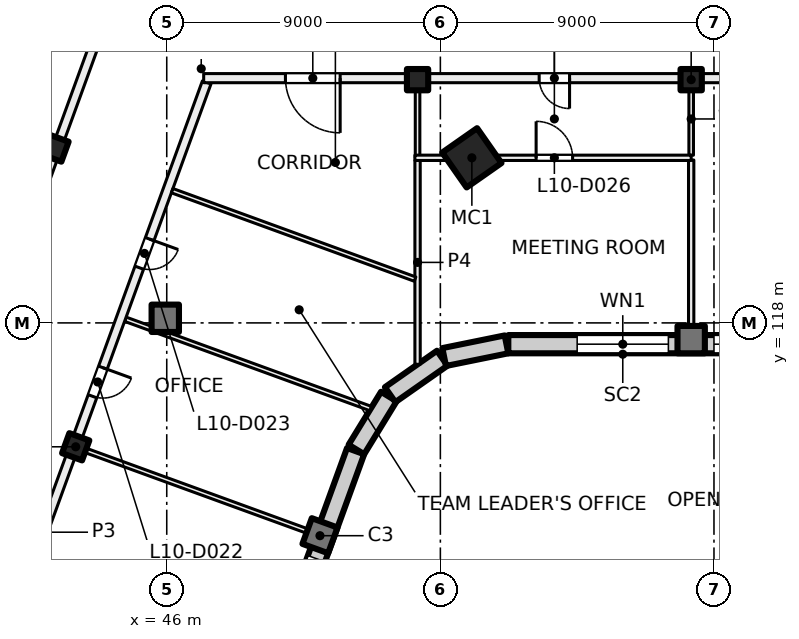
"""IFC4 building model, lengths in metres.
Left out: names, types, materials, properties, quantities, classifications, styles, units other than length and angle.
Written with IfcOpenShell. Run it as: python <this file> out.ifc"""

import sys

from ifc_helpers import new_model, si_unit, direction, frame, frame_2d, origin, origin_2d, place, context, subcontext, project, spatial, rectangle, hollow_rectangle, extrude, element, fill, save


model = new_model("IFC4")
c1 = context("Model", 3, precision=1e-05, world=origin(), true_north=direction((0.0, 1.0)))
c2 = subcontext(c1, "Body", "Model", "MODEL_VIEW")
j1 = project(units=[si_unit("LENGTHUNIT", "METRE"), si_unit("PLANEANGLEUNIT", "RADIAN")], contexts=[c1])
p1 = place(None, origin())
s1 = spatial("IfcSite", under=j1, at=p1, CompositionType="ELEMENT")
p2 = place(p1, origin())
s2 = spatial("IfcBuilding", under=s1, at=p2, CompositionType="ELEMENT")
p3 = place(p2, frame((0.0, 0.0, 47.5)))
s3 = spatial("IfcBuildingStorey", under=s2, at=p3, CompositionType="ELEMENT", Elevation=47.5)
p4 = place(p3, frame((56.036, 123.43, 0.0), z_axis=(0.0, 0.0, 1.0), x_axis=(0.573576436351, -0.819152044289, 0.0)))
e1 = element("IfcColumn", 1, at=p4, inside=s3, PredefinedType="COLUMN", context=c2, shape_type="SweptSolid", body=[
    extrude(hollow_rectangle(XDim=1.4, YDim=1.4, WallThickness=0.04, at=origin_2d()), origin(), (0.0, 0.0, 1.0), 4.0),
])
for number, where, z_axis, x_axis in (
    (2, (54.25, 126.0, 0.0), (0.0, 0.0, 1.0), (1.0, 0.0, 0.0)),
    (3, (63.25, 126.0, 0.0), (0.0, 0.0, 1.0), (1.0, 0.0, 0.0)),
):
    element("IfcColumn", number, at=place(p3, frame(where, z_axis=z_axis, x_axis=x_axis)), inside=s3, PredefinedType="COLUMN", context=c2, shape_type="SweptSolid", body=[
        extrude(rectangle(XDim=0.7, YDim=0.7, at=origin_2d()), origin(), (0.0, 0.0, 1.0), 4.0),
    ])
for number, where, z_axis, x_axis in (
    (4, (45.952, 118.152, 0.0), (0.0, 0.0, 1.0), (1.0, 0.0, 0.0)),
    (5, (63.25, 117.45, 0.0), (0.0, 0.0, 1.0), (1.0, 0.0, 0.0)),
):
    element("IfcColumn", number, at=place(p3, frame(where, z_axis=z_axis, x_axis=x_axis)), inside=s3, PredefinedType="COLUMN", context=c2, shape_type="SweptSolid", body=[
        extrude(rectangle(XDim=0.9, YDim=0.9, at=origin_2d()), origin(), (0.0, 0.0, 1.0), 4.0),
    ])
for number, where, z_axis, x_axis in (
    (6, (43.006, 113.925, 0.0), (0.0, 0.0, 1.0), (-0.342, -0.94, 0.0)),
    (7, (42.325, 123.751, 0.0), (0.0, 0.0, 1.0), (-0.342, -0.94, 0.0)),
):
    element("IfcColumn", number, at=place(p3, frame(where, z_axis=z_axis, x_axis=x_axis)), inside=s3, PredefinedType="COLUMN", context=c2, shape_type="SweptSolid", body=[
        extrude(rectangle(XDim=0.7, YDim=0.7, at=origin_2d()), origin(), (0.0, 0.0, 1.0), 4.0),
    ])
p5 = place(p3, frame((51.04, 111.001, 0.0), z_axis=(0.0, 0.0, 1.0), x_axis=(-0.342020143326, -0.939692620786, 0.0)))
e8 = element("IfcColumn", 8, at=p5, inside=s3, PredefinedType="COLUMN", context=c2, shape_type="SweptSolid", body=[
    extrude(rectangle(XDim=0.9, YDim=0.9, at=origin_2d()), origin(), (0.0, 0.0, 1.0), 4.0),
])
p6 = place(p3, frame((52.212, 113.783, 0.0), z_axis=(0.0, 0.0, 1.0), x_axis=(-0.34202521188, -0.939690775968, 0.0)))
e9 = element("IfcWall", 9, at=p6, inside=s3, PredefinedType="SOLIDWALL", context=c2, shape_type="SweptSolid", body=[
    extrude(rectangle(XDim=21.745, YDim=0.6, at=frame_2d((10.873, 0.0))), origin(), (0.0, 0.0, 1.0), 3.625),
])
p7 = place(p6, frame((3.765, 0.0, 0.9)))
e10 = element("IfcOpeningElement", 10, at=p7, cuts=e9, PredefinedType="OPENING", context=c2, shape_type="SweptSolid", body=[
    extrude(rectangle(XDim=3.0, YDim=2.4, at=frame_2d((1.5, 1.2))), frame((0.0, 0.31, 0.0), z_axis=(0.0, -1.0, 0.0), x_axis=(1.0, 0.0, 0.0)), (0.0, 0.0, 1.0), 0.62),
])
p8 = place(p6, frame((8.265, 0.0, 0.9)))
e11 = element("IfcOpeningElement", 11, at=p8, cuts=e9, PredefinedType="OPENING", context=c2, shape_type="SweptSolid", body=[
    extrude(rectangle(XDim=3.0, YDim=2.4, at=frame_2d((1.5, 1.2))), frame((0.0, 0.31, 0.0), z_axis=(0.0, -1.0, 0.0), x_axis=(1.0, 0.0, 0.0)), (0.0, 0.0, 1.0), 0.62),
])
p9 = place(p6, frame((12.765, 0.0, 0.9)))
e12 = element("IfcOpeningElement", 12, at=p9, cuts=e9, PredefinedType="OPENING", context=c2, shape_type="SweptSolid", body=[
    extrude(rectangle(XDim=3.0, YDim=2.4, at=frame_2d((1.5, 1.2))), frame((0.0, 0.31, 0.0), z_axis=(0.0, -1.0, 0.0), x_axis=(1.0, 0.0, 0.0)), (0.0, 0.0, 1.0), 0.62),
])
p10 = place(p6, frame((17.265, 0.0, 0.9)))
e13 = element("IfcOpeningElement", 13, at=p10, cuts=e9, PredefinedType="OPENING", context=c2, shape_type="SweptSolid", body=[
    extrude(rectangle(XDim=3.0, YDim=2.4, at=frame_2d((1.5, 1.2))), frame((0.0, 0.31, 0.0), z_axis=(0.0, -1.0, 0.0), x_axis=(1.0, 0.0, 0.0)), (0.0, 0.0, 1.0), 0.62),
])
p11 = place(p3, frame((53.305, 115.578, 0.0), z_axis=(0.0, 0.0, 1.0), x_axis=(-0.522402266438, -0.852699168535, 0.0)))
e14 = element("IfcWall", 14, at=p11, inside=s3, PredefinedType="SOLIDWALL", context=c2, shape_type="SweptSolid", body=[
    extrude(rectangle(XDim=2.042, YDim=0.6, at=frame_2d((1.021, 0.0))), origin(), (0.0, 0.0, 1.0), 3.625),
])
for number, where, z_axis, x_axis in (
    (15, (55.062, 116.839, 0.0), (0.0, 0.0, 1.0), (-0.819, -0.574, 0.0)),
    (16, (57.175, 117.294, 0.0), (0.0, 0.0, 1.0), (-0.98, -0.199, 0.0)),
):
    element("IfcWall", number, at=place(p3, frame(where, z_axis=z_axis, x_axis=x_axis)), inside=s3, PredefinedType="SOLIDWALL", context=c2, shape_type="SweptSolid", body=[
        extrude(rectangle(XDim=2.092, YDim=0.6, at=frame_2d((1.046, 0.0))), origin(), (0.0, 0.0, 1.0), 3.625),
    ])
p12 = place(p3, frame((90.98, 117.3, 0.0), z_axis=(0.0, 0.0, 1.0), x_axis=(-1.0, 0.0, 0.0)))
e17 = element("IfcWall", 17, at=p12, inside=s3, PredefinedType="SOLIDWALL", context=c2, shape_type="SweptSolid", body=[
    extrude(rectangle(XDim=33.745, YDim=0.6, at=frame_2d((16.873, 0.0))), origin(), (0.0, 0.0, 1.0), 3.625),
])
p13 = place(p12, frame((1.48, 0.0, 0.9)))
e18 = element("IfcOpeningElement", 18, at=p13, cuts=e17, PredefinedType="OPENING", context=c2, shape_type="SweptSolid", body=[
    extrude(rectangle(XDim=3.0, YDim=2.4, at=frame_2d((1.5, 1.2))), frame((0.0, 0.31, 0.0), z_axis=(0.0, -1.0, 0.0), x_axis=(1.0, 0.0, 0.0)), (0.0, 0.0, 1.0), 0.62),
])
p14 = place(p12, frame((5.98, 0.0, 0.9)))
e19 = element("IfcOpeningElement", 19, at=p14, cuts=e17, PredefinedType="OPENING", context=c2, shape_type="SweptSolid", body=[
    extrude(rectangle(XDim=3.0, YDim=2.4, at=frame_2d((1.5, 1.2))), frame((0.0, 0.31, 0.0), z_axis=(0.0, -1.0, 0.0), x_axis=(1.0, 0.0, 0.0)), (0.0, 0.0, 1.0), 0.62),
])
p15 = place(p12, frame((10.48, 0.0, 0.9)))
e20 = element("IfcOpeningElement", 20, at=p15, cuts=e17, PredefinedType="OPENING", context=c2, shape_type="SweptSolid", body=[
    extrude(rectangle(XDim=3.0, YDim=2.4, at=frame_2d((1.5, 1.2))), frame((0.0, 0.31, 0.0), z_axis=(0.0, -1.0, 0.0), x_axis=(1.0, 0.0, 0.0)), (0.0, 0.0, 1.0), 0.62),
])
p16 = place(p12, frame((14.98, 0.0, 0.9)))
e21 = element("IfcOpeningElement", 21, at=p16, cuts=e17, PredefinedType="OPENING", context=c2, shape_type="SweptSolid", body=[
    extrude(rectangle(XDim=3.0, YDim=2.4, at=frame_2d((1.5, 1.2))), frame((0.0, 0.31, 0.0), z_axis=(0.0, -1.0, 0.0), x_axis=(1.0, 0.0, 0.0)), (0.0, 0.0, 1.0), 0.62),
])
p17 = place(p12, frame((19.48, 0.0, 0.9)))
e22 = element("IfcOpeningElement", 22, at=p17, cuts=e17, PredefinedType="OPENING", context=c2, shape_type="SweptSolid", body=[
    extrude(rectangle(XDim=3.0, YDim=2.4, at=frame_2d((1.5, 1.2))), frame((0.0, 0.31, 0.0), z_axis=(0.0, -1.0, 0.0), x_axis=(1.0, 0.0, 0.0)), (0.0, 0.0, 1.0), 0.62),
])
p18 = place(p12, frame((23.98, 0.0, 0.9)))
e23 = element("IfcOpeningElement", 23, at=p18, cuts=e17, PredefinedType="OPENING", context=c2, shape_type="SweptSolid", body=[
    extrude(rectangle(XDim=3.0, YDim=2.4, at=frame_2d((1.5, 1.2))), frame((0.0, 0.31, 0.0), z_axis=(0.0, -1.0, 0.0), x_axis=(1.0, 0.0, 0.0)), (0.0, 0.0, 1.0), 0.62),
])
p19 = place(p12, frame((28.48, 0.0, 0.9)))
e24 = element("IfcOpeningElement", 24, at=p19, cuts=e17, PredefinedType="OPENING", context=c2, shape_type="SweptSolid", body=[
    extrude(rectangle(XDim=3.0, YDim=2.4, at=frame_2d((1.5, 1.2))), frame((0.0, 0.31, 0.0), z_axis=(0.0, -1.0, 0.0), x_axis=(1.0, 0.0, 0.0)), (0.0, 0.0, 1.0), 0.62),
])
p20 = place(p3, frame((32.881, 97.657, 0.0), z_axis=(0.0, 0.0, 1.0), x_axis=(0.342017360004, 0.939693633828, 0.0)))
e25 = element("IfcWall", 25, at=p20, inside=s3, PredefinedType="PARTITIONING", context=c2, shape_type="SweptSolid", body=[
    extrude(rectangle(XDim=34.516, YDim=0.3, at=frame_2d((17.258, 0.0))), origin(), (0.0, 0.0, 1.0), 3.625),
])
p21 = place(p20, frame((11.5, 0.0, 0.0)))
e26 = element("IfcOpeningElement", 26, at=p21, cuts=e25, PredefinedType="OPENING", context=c2, shape_type="SweptSolid", body=[
    extrude(rectangle(XDim=1.0, YDim=2.1, at=frame_2d((0.5, 1.05))), frame((0.0, 0.16, 0.0), z_axis=(0.0, -1.0, 0.0), x_axis=(1.0, 0.0, 0.0)), (0.0, 0.0, 1.0), 0.32),
])
p22 = place(p20, frame((20.1, 0.0, 0.0)))
e27 = element("IfcOpeningElement", 27, at=p22, cuts=e25, PredefinedType="OPENING", context=c2, shape_type="SweptSolid", body=[
    extrude(rectangle(XDim=1.8, YDim=2.1, at=frame_2d((0.9, 1.05))), frame((0.0, 0.16, 0.0), z_axis=(0.0, -1.0, 0.0), x_axis=(1.0, 0.0, 0.0)), (0.0, 0.0, 1.0), 0.32),
])
p23 = place(p3, frame((42.231, 123.785, 0.0), z_axis=(0.0, 0.0, 1.0), x_axis=(-0.939687752599, 0.342033518263, 0.0)))
e28 = element("IfcWall", 28, at=p23, inside=s3, PredefinedType="PARTITIONING", context=c2, shape_type="SweptSolid", body=[
    extrude(rectangle(XDim=8.301, YDim=0.175, at=frame_2d((4.15, 0.0))), origin(), (0.0, 0.0, 1.0), 3.625),
])
p24 = place(p3, frame((43.1, 113.891, 0.0), z_axis=(0.0, 0.0, 1.0), x_axis=(0.939670544866, -0.342080790328, 0.0)))
e29 = element("IfcWall", 29, at=p24, inside=s3, PredefinedType="PARTITIONING", context=c2, shape_type="SweptSolid", body=[
    extrude(rectangle(XDim=8.3, YDim=0.15, at=frame_2d((4.15, 0.0))), origin(), (0.0, 0.0, 1.0), 3.625),
])
p25 = place(p3, frame((44.639, 118.12, 0.0), z_axis=(0.0, 0.0, 1.0), x_axis=(0.939669707102, -0.342083091593, 0.0)))
e30 = element("IfcWall", 30, at=p25, inside=s3, PredefinedType="PARTITIONING", context=c2, shape_type="SweptSolid", body=[
    extrude(rectangle(XDim=8.589, YDim=0.15, at=frame_2d((4.295, 0.0))), origin(), (0.0, 0.0, 1.0), 3.625),
])
p26 = place(p3, frame((47.314, 125.909, 0.0), z_axis=(0.0, 0.0, 1.0), x_axis=(-0.342010770371, -0.939696032209, 0.0)))
e31 = element("IfcWall", 31, at=p26, inside=s3, PredefinedType="PARTITIONING", context=c2, shape_type="SweptSolid", body=[
    extrude(rectangle(XDim=31.485, YDim=0.3, at=frame_2d((15.742, 0.0))), origin(), (0.0, 0.0, 1.0), 3.625),
])
p27 = place(p26, frame((22.21, 0.0, 0.0)))
e32 = element("IfcOpeningElement", 32, at=p27, cuts=e31, PredefinedType="OPENING", context=c2, shape_type="SweptSolid", body=[
    extrude(rectangle(XDim=1.8, YDim=2.1, at=frame_2d((0.9, 1.05))), frame((0.0, 0.16, 0.0), z_axis=(0.0, -1.0, 0.0), x_axis=(1.0, 0.0, 0.0)), (0.0, 0.0, 1.0), 0.32),
])
p28 = place(p26, frame((9.985, 0.0, 0.0)))
e33 = element("IfcOpeningElement", 33, at=p28, cuts=e31, PredefinedType="OPENING", context=c2, shape_type="SweptSolid", body=[
    extrude(rectangle(XDim=1.0, YDim=2.1, at=frame_2d((0.5, 1.05))), frame((0.0, 0.16, 0.0), z_axis=(0.0, -1.0, 0.0), x_axis=(1.0, 0.0, 0.0)), (0.0, 0.0, 1.0), 0.32),
])
p29 = place(p26, frame((5.484, 0.0, 0.0)))
e34 = element("IfcOpeningElement", 34, at=p29, cuts=e31, PredefinedType="OPENING", context=c2, shape_type="SweptSolid", body=[
    extrude(rectangle(XDim=1.0, YDim=2.1, at=frame_2d((0.5, 1.05))), frame((0.0, 0.16, 0.0), z_axis=(0.0, -1.0, 0.0), x_axis=(1.0, 0.0, 0.0)), (0.0, 0.0, 1.0), 0.32),
])
p30 = place(p3, frame((54.25, 116.638, 0.0), z_axis=(0.0, 0.0, 1.0), x_axis=(0.0, 1.0, 0.0)))
e35 = element("IfcWall", 35, at=p30, inside=s3, PredefinedType="PARTITIONING", context=c2, shape_type="SweptSolid", body=[
    extrude(rectangle(XDim=6.704, YDim=0.175, at=frame_2d((3.352, 0.0))), origin(), (0.0, 0.0, 1.0), 3.625),
])
p31 = place(p3, frame((54.168, 119.44, 0.0), z_axis=(0.0, 0.0, 1.0), x_axis=(-0.939652508948, 0.342130329594, 0.0)))
e36 = element("IfcWall", 36, at=p31, inside=s3, PredefinedType="PARTITIONING", context=c2, shape_type="SweptSolid", body=[
    extrude(rectangle(XDim=8.503, YDim=0.15, at=frame_2d((4.251, 0.0))), origin(), (0.0, 0.0, 1.0), 3.625),
])
p32 = place(p3, frame((54.25, 125.9, 0.0), z_axis=(0.0, 0.0, 1.0), x_axis=(0.0, -1.0, 0.0)))
e37 = element("IfcWall", 37, at=p32, inside=s3, PredefinedType="PARTITIONING", context=c2, shape_type="SweptSolid", body=[
    extrude(rectangle(XDim=2.473, YDim=0.15, at=frame_2d((1.236, 0.0))), origin(), (0.0, 0.0, 1.0), 3.625),
])
p33 = place(p3, frame((63.25, 117.6, 0.0), z_axis=(0.0, 0.0, 1.0), x_axis=(0.0, 1.0, 0.0)))
e38 = element("IfcWall", 38, at=p33, inside=s3, PredefinedType="PARTITIONING", context=c2, shape_type="SweptSolid", body=[
    extrude(rectangle(XDim=5.758, YDim=0.175, at=frame_2d((2.879, 0.0))), origin(), (0.0, 0.0, 1.0), 3.625),
])
p34 = place(p3, frame((63.25, 123.515, 0.0), z_axis=(0.0, 0.0, 1.0), x_axis=(0.0, 1.0, 0.0)))
e39 = element("IfcWall", 39, at=p34, inside=s3, PredefinedType="PARTITIONING", context=c2, shape_type="SweptSolid", body=[
    extrude(rectangle(XDim=2.385, YDim=0.15, at=frame_2d((1.192, 0.0))), origin(), (0.0, 0.0, 1.0), 3.625),
])
p35 = place(p3, frame((54.162, 123.43, 0.0), z_axis=(0.0, 0.0, 1.0), x_axis=(1.0, 0.0, 0.0)))
e40 = element("IfcWall", 40, at=p35, inside=s3, PredefinedType="PARTITIONING", context=c2, shape_type="SweptSolid", body=[
    extrude(rectangle(XDim=9.088, YDim=0.175, at=frame_2d((4.544, 0.0))), origin(), (0.0, 0.0, 1.0), 3.625),
])
p36 = place(p35, frame((3.988, 0.0, 0.0)))
e41 = element("IfcOpeningElement", 41, at=p36, cuts=e40, PredefinedType="OPENING", context=c2, shape_type="SweptSolid", body=[
    extrude(rectangle(XDim=1.2, YDim=2.1, at=frame_2d((0.6, 1.05))), frame((0.0, 0.097, 0.0), z_axis=(0.0, -1.0, 0.0), x_axis=(1.0, 0.0, 0.0)), (0.0, 0.0, 1.0), 0.195),
])
p37 = place(p3, frame((91.0, 126.05, 0.0), z_axis=(0.0, 0.0, 1.0), x_axis=(-1.0, 0.0, 0.0)))
e42 = element("IfcWall", 42, at=p37, inside=s3, PredefinedType="PARTITIONING", context=c2, shape_type="SweptSolid", body=[
    extrude(rectangle(XDim=43.785, YDim=0.3, at=frame_2d((21.893, 0.0))), origin(), (0.0, 0.0, 1.0), 3.625),
])
p38 = place(p37, frame((2.125, 0.0, 0.0)))
e43 = element("IfcOpeningElement", 43, at=p38, cuts=e42, PredefinedType="OPENING", context=c2, shape_type="SweptSolid", body=[
    extrude(rectangle(XDim=1.0, YDim=2.1, at=frame_2d((0.5, 1.05))), frame((0.0, 0.16, 0.0), z_axis=(0.0, -1.0, 0.0), x_axis=(1.0, 0.0, 0.0)), (0.0, 0.0, 1.0), 0.32),
])
p39 = place(p37, frame((7.0, 0.0, 0.0)))
e44 = element("IfcOpeningElement", 44, at=p39, cuts=e42, PredefinedType="OPENING", context=c2, shape_type="SweptSolid", body=[
    extrude(rectangle(XDim=1.0, YDim=2.1, at=frame_2d((0.5, 1.05))), frame((0.0, 0.16, 0.0), z_axis=(0.0, -1.0, 0.0), x_axis=(1.0, 0.0, 0.0)), (0.0, 0.0, 1.0), 0.32),
])
p40 = place(p37, frame((11.5, 0.0, 0.0)))
e45 = element("IfcOpeningElement", 45, at=p40, cuts=e42, PredefinedType="OPENING", context=c2, shape_type="SweptSolid", body=[
    extrude(rectangle(XDim=1.0, YDim=2.1, at=frame_2d((0.5, 1.05))), frame((0.0, 0.16, 0.0), z_axis=(0.0, -1.0, 0.0), x_axis=(1.0, 0.0, 0.0)), (0.0, 0.0, 1.0), 0.32),
])
p41 = place(p37, frame((16.0, 0.0, 0.0)))
e46 = element("IfcOpeningElement", 46, at=p41, cuts=e42, PredefinedType="OPENING", context=c2, shape_type="SweptSolid", body=[
    extrude(rectangle(XDim=1.0, YDim=2.1, at=frame_2d((0.5, 1.05))), frame((0.0, 0.16, 0.0), z_axis=(0.0, -1.0, 0.0), x_axis=(1.0, 0.0, 0.0)), (0.0, 0.0, 1.0), 0.32),
])
p42 = place(p37, frame((20.5, 0.0, 0.0)))
e47 = element("IfcOpeningElement", 47, at=p42, cuts=e42, PredefinedType="OPENING", context=c2, shape_type="SweptSolid", body=[
    extrude(rectangle(XDim=1.0, YDim=2.1, at=frame_2d((0.5, 1.05))), frame((0.0, 0.16, 0.0), z_axis=(0.0, -1.0, 0.0), x_axis=(1.0, 0.0, 0.0)), (0.0, 0.0, 1.0), 0.32),
])
p43 = place(p37, frame((31.75, 0.0, 0.0)))
e48 = element("IfcOpeningElement", 48, at=p43, cuts=e42, PredefinedType="OPENING", context=c2, shape_type="SweptSolid", body=[
    extrude(rectangle(XDim=1.0, YDim=2.1, at=frame_2d((0.5, 1.05))), frame((0.0, 0.16, 0.0), z_axis=(0.0, -1.0, 0.0), x_axis=(1.0, 0.0, 0.0)), (0.0, 0.0, 1.0), 0.32),
])
p44 = place(p37, frame((39.296, 0.0, 0.0)))
e49 = element("IfcOpeningElement", 49, at=p44, cuts=e42, PredefinedType="OPENING", context=c2, shape_type="SweptSolid", body=[
    extrude(rectangle(XDim=1.8, YDim=2.1, at=frame_2d((0.9, 1.05))), frame((0.0, 0.16, 0.0), z_axis=(0.0, -1.0, 0.0), x_axis=(1.0, 0.0, 0.0)), (0.0, 0.0, 1.0), 0.32),
])
p45 = place(p7, origin())
e50 = element("IfcWindow", 50, at=p45, inside=s3, PartitioningType="SINGLE_PANEL", PredefinedType="WINDOW", context=c2, shape_type="SweptSolid", body=[
    extrude(rectangle(XDim=3.0, YDim=2.4, at=frame_2d((1.5, 1.2))), frame((0.0, 0.03, 0.0), z_axis=(0.0, -1.0, 0.0), x_axis=(1.0, 0.0, 0.0)), (0.0, 0.0, 1.0), 0.06),
])
fill(e10, e50)
p46 = place(p18, origin())
e51 = element("IfcWindow", 51, at=p46, inside=s3, PartitioningType="SINGLE_PANEL", PredefinedType="WINDOW", context=c2, shape_type="SweptSolid", body=[
    extrude(rectangle(XDim=3.0, YDim=2.4, at=frame_2d((1.5, 1.2))), frame((0.0, 0.03, 0.0), z_axis=(0.0, -1.0, 0.0), x_axis=(1.0, 0.0, 0.0)), (0.0, 0.0, 1.0), 0.06),
])
fill(e23, e51)
p47 = place(p19, origin())
e52 = element("IfcWindow", 52, at=p47, inside=s3, PartitioningType="SINGLE_PANEL", PredefinedType="WINDOW", context=c2, shape_type="SweptSolid", body=[
    extrude(rectangle(XDim=3.0, YDim=2.4, at=frame_2d((1.5, 1.2))), frame((0.0, 0.03, 0.0), z_axis=(0.0, -1.0, 0.0), x_axis=(1.0, 0.0, 0.0)), (0.0, 0.0, 1.0), 0.06),
])
fill(e24, e52)
p48 = place(p43, origin())
e53 = element("IfcDoor", 53, at=p48, inside=s3, OperationType="SINGLE_SWING_LEFT", PredefinedType="DOOR", context=c2, shape_type="SweptSolid", body=[
    extrude(rectangle(XDim=1.0, YDim=2.1, at=frame_2d((0.5, 1.05))), frame((0.0, 0.025, 0.0), z_axis=(0.0, -1.0, 0.0), x_axis=(1.0, 0.0, 0.0)), (0.0, 0.0, 1.0), 0.05),
])
fill(e48, e53)
p49 = place(p28, origin())
e54 = element("IfcDoor", 54, at=p49, inside=s3, OperationType="SINGLE_SWING_LEFT", PredefinedType="DOOR", context=c2, shape_type="SweptSolid", body=[
    extrude(rectangle(XDim=1.0, YDim=2.1, at=frame_2d((0.5, 1.05))), frame((0.0, 0.025, 0.0), z_axis=(0.0, -1.0, 0.0), x_axis=(1.0, 0.0, 0.0)), (0.0, 0.0, 1.0), 0.05),
])
fill(e33, e54)
p50 = place(p29, origin())
e55 = element("IfcDoor", 55, at=p50, inside=s3, OperationType="SINGLE_SWING_LEFT", PredefinedType="DOOR", context=c2, shape_type="SweptSolid", body=[
    extrude(rectangle(XDim=1.0, YDim=2.1, at=frame_2d((0.5, 1.05))), frame((0.0, 0.025, 0.0), z_axis=(0.0, -1.0, 0.0), x_axis=(1.0, 0.0, 0.0)), (0.0, 0.0, 1.0), 0.05),
])
fill(e34, e55)
p51 = place(p44, origin())
e56 = element("IfcDoor", 56, at=p51, inside=s3, OperationType="DOUBLE_DOOR_SINGLE_SWING", PredefinedType="DOOR", context=c2, shape_type="SweptSolid", body=[
    extrude(rectangle(XDim=1.8, YDim=2.1, at=frame_2d((0.9, 1.05))), frame((0.0, 0.025, 0.0), z_axis=(0.0, -1.0, 0.0), x_axis=(1.0, 0.0, 0.0)), (0.0, 0.0, 1.0), 0.05),
])
fill(e49, e56)
p52 = place(p36, origin())
e57 = element("IfcDoor", 57, at=p52, inside=s3, OperationType="DOUBLE_DOOR_SINGLE_SWING", PredefinedType="DOOR", context=c2, shape_type="SweptSolid", body=[
    extrude(rectangle(XDim=1.2, YDim=2.1, at=frame_2d((0.6, 1.05))), frame((0.0, 0.025, 0.0), z_axis=(0.0, -1.0, 0.0), x_axis=(1.0, 0.0, 0.0)), (0.0, 0.0, 1.0), 0.05),
])
fill(e41, e57)
save(model, sys.argv[1])
